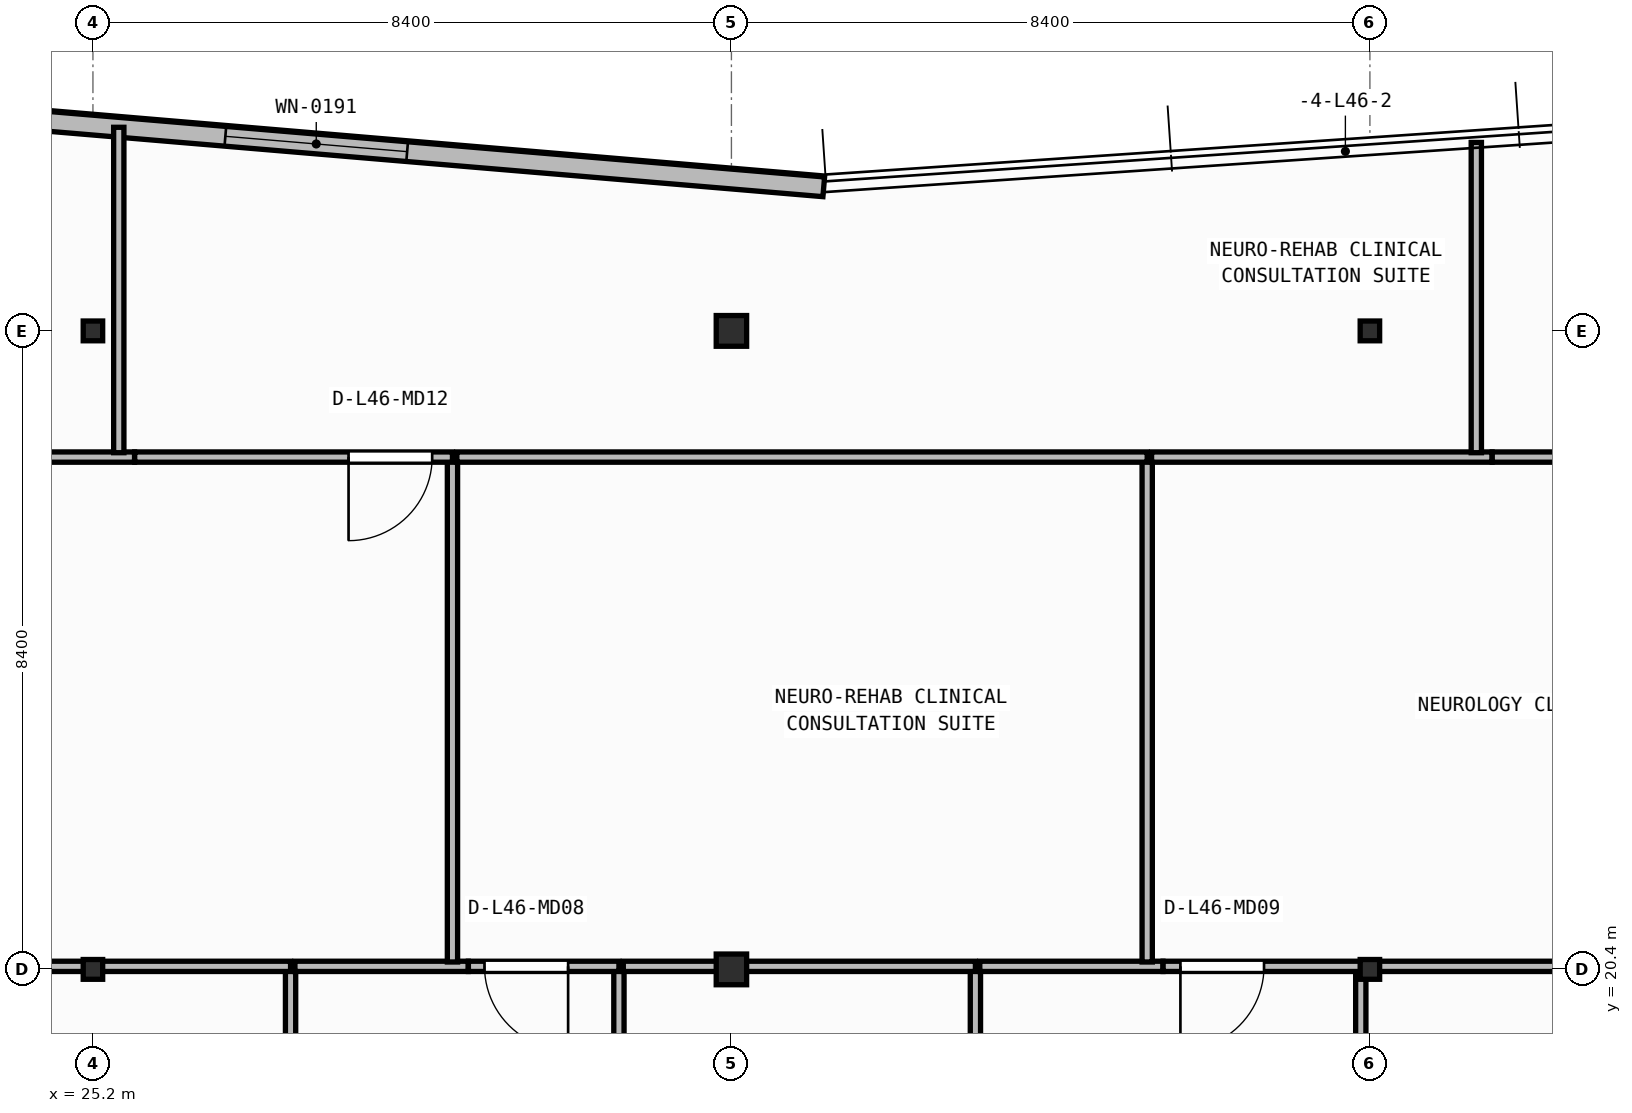
"""IFC4 building model, lengths in metres.
Left out: names, types, materials, properties, quantities, classifications, styles, units other than length and angle.
Written with IfcOpenShell. Run it as: python <this file> out.ifc"""

import sys

from ifc_helpers import new_model, si_unit, direction, frame, frame_2d, origin, origin_2d, place, context, subcontext, project, spatial, rectangle, i_section, extrude, element, fill, save


model = new_model("IFC4")
c1 = context("Model", 3, precision=1e-05, world=origin(), true_north=direction((0.0, 1.0)))
c2 = subcontext(c1, "Body", "Model", "MODEL_VIEW")
j1 = project(units=[si_unit("LENGTHUNIT", "METRE"), si_unit("PLANEANGLEUNIT", "RADIAN")], contexts=[c1])
p1 = place(None, origin())
s1 = spatial("IfcSite", under=j1, at=p1, CompositionType="ELEMENT")
p2 = place(p1, origin())
s2 = spatial("IfcBuilding", under=s1, at=p2, CompositionType="ELEMENT")
p3 = place(p2, frame((0.0, 0.0, 188.15)))
s3 = spatial("IfcBuildingStorey", under=s2, at=p3, CompositionType="ELEMENT", Elevation=188.15)
p4 = place(p3, frame((25.2, 20.4, 0.0), z_axis=(0.0, 0.0, 1.0), x_axis=(1.0, 0.0, 0.0)))
e1 = element("IfcColumn", 1, at=p4, inside=s3, PredefinedType="COLUMN", context=c2, shape_type="SweptSolid", body=[
    extrude(i_section(OverallWidth=0.256, OverallDepth=0.26, WebThickness=0.01, FlangeThickness=0.017, FilletRadius=0.013, at=origin_2d()), origin(), (0.0, 0.0, 1.0), 3.95),
])
p5 = place(p3, frame((33.6, 20.4, 0.0), z_axis=(0.0, 0.0, 1.0), x_axis=(1.0, 0.0, 0.0)))
e2 = element("IfcColumn", 2, at=p5, inside=s3, PredefinedType="COLUMN", context=c2, shape_type="SweptSolid", body=[
    extrude(i_section(OverallWidth=0.4, OverallDepth=0.404, WebThickness=0.02, FlangeThickness=0.032, at=origin_2d()), origin(), (0.0, 0.0, 1.0), 3.95),
])
for number, where, z_axis, x_axis in (
    (3, (42.0, 20.4, 0.0), (0.0, 0.0, 1.0), (1.0, 0.0, 0.0)),
    (4, (25.2, 28.8, 0.0), (0.0, 0.0, 1.0), (1.0, 0.0, 0.0)),
):
    element("IfcColumn", number, at=place(p3, frame(where, z_axis=z_axis, x_axis=x_axis)), inside=s3, PredefinedType="COLUMN", context=c2, shape_type="SweptSolid", body=[
        extrude(i_section(OverallWidth=0.256, OverallDepth=0.26, WebThickness=0.01, FlangeThickness=0.017, FilletRadius=0.013, at=origin_2d()), origin(), (0.0, 0.0, 1.0), 3.95),
    ])
p6 = place(p3, frame((33.6, 28.8, 0.0), z_axis=(0.0, 0.0, 1.0), x_axis=(1.0, 0.0, 0.0)))
e5 = element("IfcColumn", 5, at=p6, inside=s3, PredefinedType="COLUMN", context=c2, shape_type="SweptSolid", body=[
    extrude(i_section(OverallWidth=0.4, OverallDepth=0.404, WebThickness=0.02, FlangeThickness=0.032, at=origin_2d()), origin(), (0.0, 0.0, 1.0), 3.95),
])
p7 = place(p3, frame((42.0, 28.8, 0.0), z_axis=(0.0, 0.0, 1.0), x_axis=(1.0, 0.0, 0.0)))
e6 = element("IfcColumn", 6, at=p7, inside=s3, PredefinedType="COLUMN", context=c2, shape_type="SweptSolid", body=[
    extrude(i_section(OverallWidth=0.256, OverallDepth=0.26, WebThickness=0.01, FlangeThickness=0.017, FilletRadius=0.013, at=origin_2d()), origin(), (0.0, 0.0, 1.0), 3.95),
])
p8 = place(p3, frame((34.815, 30.696, 0.0), z_axis=(0.0, 0.0, 1.0), x_axis=(-0.996454704935, 0.084130975344, 0.0)))
e7 = element("IfcWall", 7, at=p8, inside=s3, PredefinedType="STANDARD", context=c2, shape_type="SweptSolid", body=[
    extrude(rectangle(XDim=13.401, YDim=0.26, at=frame_2d((6.701, 0.0))), origin(), (0.0, 0.0, 1.0), 3.71),
])
p9 = place(p8, frame((5.5, 0.0, 0.9)))
e8 = element("IfcOpeningElement", 8, at=p9, cuts=e7, PredefinedType="OPENING", context=c2, shape_type="SweptSolid", body=[
    extrude(rectangle(XDim=2.4, YDim=1.65, at=frame_2d((1.2, 0.825))), frame((0.0, 0.14, 0.0), z_axis=(0.0, -1.0, 0.0), x_axis=(1.0, 0.0, 0.0)), (0.0, 0.0, 1.0), 0.28),
])
p10 = place(p3, frame((27.8, 17.833, 0.0), z_axis=(0.0, 0.0, 1.0), x_axis=(0.0, 1.0, 0.0)))
e9 = element("IfcWall", 9, at=p10, inside=s3, PredefinedType="PARTITIONING", context=c2, shape_type="SweptSolid", body=[
    extrude(rectangle(XDim=2.607, YDim=0.135, at=frame_2d((1.304, 0.0))), origin(), (0.0, 0.0, 1.0), 3.71),
])
p11 = place(p3, frame((27.8, 20.44, 0.0), z_axis=(0.0, 0.0, 1.0), x_axis=(-1.0, 0.0, 0.0)))
e10 = element("IfcWall", 10, at=p11, inside=s3, PredefinedType="PARTITIONING", context=c2, shape_type="SweptSolid", body=[
    extrude(rectangle(XDim=5.012, YDim=0.135, at=frame_2d((2.506, 0.0))), origin(), (0.0, 0.0, 1.0), 3.152),
])
p12 = place(p3, frame((32.12, 14.76, 0.0), z_axis=(0.0, 0.0, 1.0), x_axis=(0.0, 1.0, 0.0)))
e11 = element("IfcWall", 11, at=p12, inside=s3, PredefinedType="PARTITIONING", context=c2, shape_type="SweptSolid", body=[
    extrude(rectangle(XDim=5.68, YDim=0.135, at=frame_2d((2.84, 0.0))), origin(), (0.0, 0.0, 1.0), 3.71),
])
p13 = place(p3, frame((30.137, 20.44, 0.0), z_axis=(0.0, 0.0, 1.0), x_axis=(-1.0, 0.0, 0.0)))
e12 = element("IfcWall", 12, at=p13, inside=s3, PredefinedType="PARTITIONING", context=c2, shape_type="SweptSolid", body=[
    extrude(rectangle(XDim=2.28, YDim=0.135, at=frame_2d((1.14, 0.0))), origin(), (0.0, 0.0, 1.0), 3.152),
])
p14 = place(p3, frame((32.12, 20.44, 0.0), z_axis=(0.0, 0.0, 1.0), x_axis=(-1.0, 0.0, 0.0)))
e13 = element("IfcWall", 13, at=p14, inside=s3, PredefinedType="PARTITIONING", context=c2, shape_type="SweptSolid", body=[
    extrude(rectangle(XDim=1.981, YDim=0.135, at=frame_2d((0.99, 0.0))), origin(), (0.0, 0.0, 1.0), 3.152),
])
p15 = place(p14, frame((0.668, 0.0, 0.0)))
e14 = element("IfcOpeningElement", 14, at=p15, cuts=e13, PredefinedType="OPENING", context=c2, shape_type="SweptSolid", body=[
    extrude(rectangle(XDim=1.1, YDim=2.1, at=frame_2d((0.55, 1.05))), frame((0.0, 0.077, 0.0), z_axis=(0.0, -1.0, 0.0), x_axis=(1.0, 0.0, 0.0)), (0.0, 0.0, 1.0), 0.155),
])
p16 = place(p3, frame((36.81, 17.833, 0.0), z_axis=(0.0, 0.0, 1.0), x_axis=(0.0, 1.0, 0.0)))
e15 = element("IfcWall", 15, at=p16, inside=s3, PredefinedType="PARTITIONING", context=c2, shape_type="SweptSolid", body=[
    extrude(rectangle(XDim=2.607, YDim=0.135, at=frame_2d((1.304, 0.0))), origin(), (0.0, 0.0, 1.0), 3.71),
])
p17 = place(p3, frame((36.81, 20.44, 0.0), z_axis=(0.0, 0.0, 1.0), x_axis=(-1.0, 0.0, 0.0)))
e16 = element("IfcWall", 16, at=p17, inside=s3, PredefinedType="PARTITIONING", context=c2, shape_type="SweptSolid", body=[
    extrude(rectangle(XDim=4.633, YDim=0.135, at=frame_2d((2.316, 0.0))), origin(), (0.0, 0.0, 1.0), 3.152),
])
p18 = place(p3, frame((41.88, 14.76, 0.0), z_axis=(0.0, 0.0, 1.0), x_axis=(0.0, 1.0, 0.0)))
e17 = element("IfcWall", 17, at=p18, inside=s3, PredefinedType="PARTITIONING", context=c2, shape_type="SweptSolid", body=[
    extrude(rectangle(XDim=5.68, YDim=0.135, at=frame_2d((2.84, 0.0))), origin(), (0.0, 0.0, 1.0), 3.152),
])
p19 = place(p3, frame((39.278, 20.44, 0.0), z_axis=(0.0, 0.0, 1.0), x_axis=(-1.0, 0.0, 0.0)))
e18 = element("IfcWall", 18, at=p19, inside=s3, PredefinedType="PARTITIONING", context=c2, shape_type="SweptSolid", body=[
    extrude(rectangle(XDim=2.41, YDim=0.135, at=frame_2d((1.205, 0.0))), origin(), (0.0, 0.0, 1.0), 3.152),
])
p20 = place(p3, frame((41.88, 20.44, 0.0), z_axis=(0.0, 0.0, 1.0), x_axis=(-1.0, 0.0, 0.0)))
e19 = element("IfcWall", 19, at=p20, inside=s3, PredefinedType="PARTITIONING", context=c2, shape_type="SweptSolid", body=[
    extrude(rectangle(XDim=2.6, YDim=0.135, at=frame_2d((1.3, 0.0))), origin(), (0.0, 0.0, 1.0), 3.152),
])
p21 = place(p20, frame((1.273, 0.0, 0.0)))
e20 = element("IfcOpeningElement", 20, at=p21, cuts=e19, PredefinedType="OPENING", context=c2, shape_type="SweptSolid", body=[
    extrude(rectangle(XDim=1.1, YDim=2.1, at=frame_2d((0.55, 1.05))), frame((0.0, 0.077, 0.0), z_axis=(0.0, -1.0, 0.0), x_axis=(1.0, 0.0, 0.0)), (0.0, 0.0, 1.0), 0.155),
])
p22 = place(p3, frame((46.2, 20.44, 0.0), z_axis=(0.0, 0.0, 1.0), x_axis=(-1.0, 0.0, 0.0)))
e21 = element("IfcWall", 21, at=p22, inside=s3, PredefinedType="PARTITIONING", context=c2, shape_type="SweptSolid", body=[
    extrude(rectangle(XDim=4.262, YDim=0.135, at=frame_2d((2.131, 0.0))), origin(), (0.0, 0.0, 1.0), 3.152),
])
p23 = place(p3, frame((29.93, 20.498, 0.0), z_axis=(0.0, 0.0, 1.0), x_axis=(0.0, 1.0, 0.0)))
e22 = element("IfcWall", 22, at=p23, inside=s3, PredefinedType="PARTITIONING", context=c2, shape_type="SweptSolid", body=[
    extrude(rectangle(XDim=6.642, YDim=0.135, at=frame_2d((3.321, 0.0))), origin(), (0.0, 0.0, 1.0), 3.71),
])
p24 = place(p3, frame((25.748, 27.14, 0.0), z_axis=(0.0, 0.0, 1.0), x_axis=(-1.0, 0.0, 0.0)))
e23 = element("IfcWall", 23, at=p24, inside=s3, PredefinedType="PARTITIONING", context=c2, shape_type="SweptSolid", body=[
    extrude(rectangle(XDim=11.968, YDim=0.135, at=frame_2d((5.984, 0.0))), origin(), (0.0, 0.0, 1.0), 3.71),
])
p25 = place(p3, frame((29.93, 27.14, 0.0), z_axis=(0.0, 0.0, 1.0), x_axis=(-1.0, 0.0, 0.0)))
e24 = element("IfcWall", 24, at=p25, inside=s3, PredefinedType="PARTITIONING", context=c2, shape_type="SweptSolid", body=[
    extrude(rectangle(XDim=4.18, YDim=0.135, at=frame_2d((2.09, 0.0))), origin(), (0.0, 0.0, 1.0), 3.71),
])
p26 = place(p25, frame((0.267, 0.0, 0.0)))
e25 = element("IfcOpeningElement", 25, at=p26, cuts=e24, PredefinedType="OPENING", context=c2, shape_type="SweptSolid", body=[
    extrude(rectangle(XDim=1.1, YDim=2.1, at=frame_2d((0.55, 1.05))), frame((0.0, 0.077, 0.0), z_axis=(0.0, -1.0, 0.0), x_axis=(1.0, 0.0, 0.0)), (0.0, 0.0, 1.0), 0.155),
])
p27 = place(p3, frame((39.07, 20.498, 0.0), z_axis=(0.0, 0.0, 1.0), x_axis=(0.0, 1.0, 0.0)))
e26 = element("IfcWall", 26, at=p27, inside=s3, PredefinedType="PARTITIONING", context=c2, shape_type="SweptSolid", body=[
    extrude(rectangle(XDim=6.642, YDim=0.135, at=frame_2d((3.321, 0.0))), origin(), (0.0, 0.0, 1.0), 3.71),
])
p28 = place(p3, frame((39.07, 27.14, 0.0), z_axis=(0.0, 0.0, 1.0), x_axis=(-1.0, 0.0, 0.0)))
e27 = element("IfcWall", 27, at=p28, inside=s3, PredefinedType="PARTITIONING", context=c2, shape_type="SweptSolid", body=[
    extrude(rectangle(XDim=9.083, YDim=0.135, at=frame_2d((4.541, 0.0))), origin(), (0.0, 0.0, 1.0), 3.71),
])
p29 = place(p3, frame((43.607, 27.14, 0.0), z_axis=(0.0, 0.0, 1.0), x_axis=(-1.0, 0.0, 0.0)))
e28 = element("IfcWall", 28, at=p29, inside=s3, PredefinedType="PARTITIONING", context=c2, shape_type="SweptSolid", body=[
    extrude(rectangle(XDim=4.48, YDim=0.135, at=frame_2d((2.24, 0.0))), origin(), (0.0, 0.0, 1.0), 3.71),
])
p30 = place(p3, frame((51.04, 27.14, 0.0), z_axis=(0.0, 0.0, 1.0), x_axis=(-1.0, 0.0, 0.0)))
e29 = element("IfcWall", 29, at=p30, inside=s3, PredefinedType="PARTITIONING", context=c2, shape_type="SweptSolid", body=[
    extrude(rectangle(XDim=7.43, YDim=0.135, at=frame_2d((3.715, 0.0))), origin(), (0.0, 0.0, 1.0), 3.71),
])
p31 = place(p30, frame((0.348, 0.0, 0.0)))
e30 = element("IfcOpeningElement", 30, at=p31, cuts=e29, PredefinedType="OPENING", context=c2, shape_type="SweptSolid", body=[
    extrude(rectangle(XDim=1.1, YDim=2.1, at=frame_2d((0.55, 1.05))), frame((0.0, 0.077, 0.0), z_axis=(0.0, -1.0, 0.0), x_axis=(1.0, 0.0, 0.0)), (0.0, 0.0, 1.0), 0.155),
])
p32 = place(p3, frame((25.54, 27.198, 0.0), z_axis=(0.0, 0.0, 1.0), x_axis=(0.0, 1.0, 0.0)))
e31 = element("IfcWall", 31, at=p32, inside=s3, PredefinedType="PARTITIONING", context=c2, shape_type="SweptSolid", body=[
    extrude(rectangle(XDim=4.281, YDim=0.135, at=frame_2d((2.141, 0.0))), origin(), (0.0, 0.0, 1.0), 3.152),
])
p33 = place(p3, frame((43.4, 27.198, 0.0), z_axis=(0.0, 0.0, 1.0), x_axis=(0.0, 1.0, 0.0)))
e32 = element("IfcWall", 32, at=p33, inside=s3, PredefinedType="PARTITIONING", context=c2, shape_type="SweptSolid", body=[
    extrude(rectangle(XDim=4.082, YDim=0.135, at=frame_2d((2.041, 0.0))), origin(), (0.0, 0.0, 1.0), 3.71),
])
p34 = place(p9, origin())
e33 = element("IfcWindow", 33, at=p34, inside=s3, PartitioningType="SINGLE_PANEL", PredefinedType="WINDOW", context=c2, shape_type="SweptSolid", body=[
    extrude(rectangle(XDim=2.4, YDim=1.65, at=frame_2d((1.2, 0.825))), frame((0.0, 0.03, 0.0), z_axis=(0.0, -1.0, 0.0), x_axis=(1.0, 0.0, 0.0)), (0.0, 0.0, 1.0), 0.06),
])
fill(e8, e33)
p35 = place(p15, origin())
e34 = element("IfcDoor", 34, at=p35, inside=s3, OperationType="SINGLE_SWING_LEFT", PredefinedType="DOOR", context=c2, shape_type="SweptSolid", body=[
    extrude(rectangle(XDim=1.1, YDim=2.1, at=frame_2d((0.55, 1.05))), frame((0.0, 0.025, 0.0), z_axis=(0.0, -1.0, 0.0), x_axis=(1.0, 0.0, 0.0)), (0.0, 0.0, 1.0), 0.05),
])
fill(e14, e34)
p36 = place(p21, origin())
e35 = element("IfcDoor", 35, at=p36, inside=s3, OperationType="SINGLE_SWING_RIGHT", PredefinedType="DOOR", context=c2, shape_type="SweptSolid", body=[
    extrude(rectangle(XDim=1.1, YDim=2.1, at=frame_2d((0.55, 1.05))), frame((0.0, 0.025, 0.0), z_axis=(0.0, -1.0, 0.0), x_axis=(1.0, 0.0, 0.0)), (0.0, 0.0, 1.0), 0.05),
])
fill(e20, e35)
p37 = place(p26, origin())
e36 = element("IfcDoor", 36, at=p37, inside=s3, OperationType="SINGLE_SWING_RIGHT", PredefinedType="DOOR", context=c2, shape_type="SweptSolid", body=[
    extrude(rectangle(XDim=1.1, YDim=2.1, at=frame_2d((0.55, 1.05))), frame((0.0, 0.025, 0.0), z_axis=(0.0, -1.0, 0.0), x_axis=(1.0, 0.0, 0.0)), (0.0, 0.0, 1.0), 0.05),
])
fill(e25, e36)
save(model, sys.argv[1])
